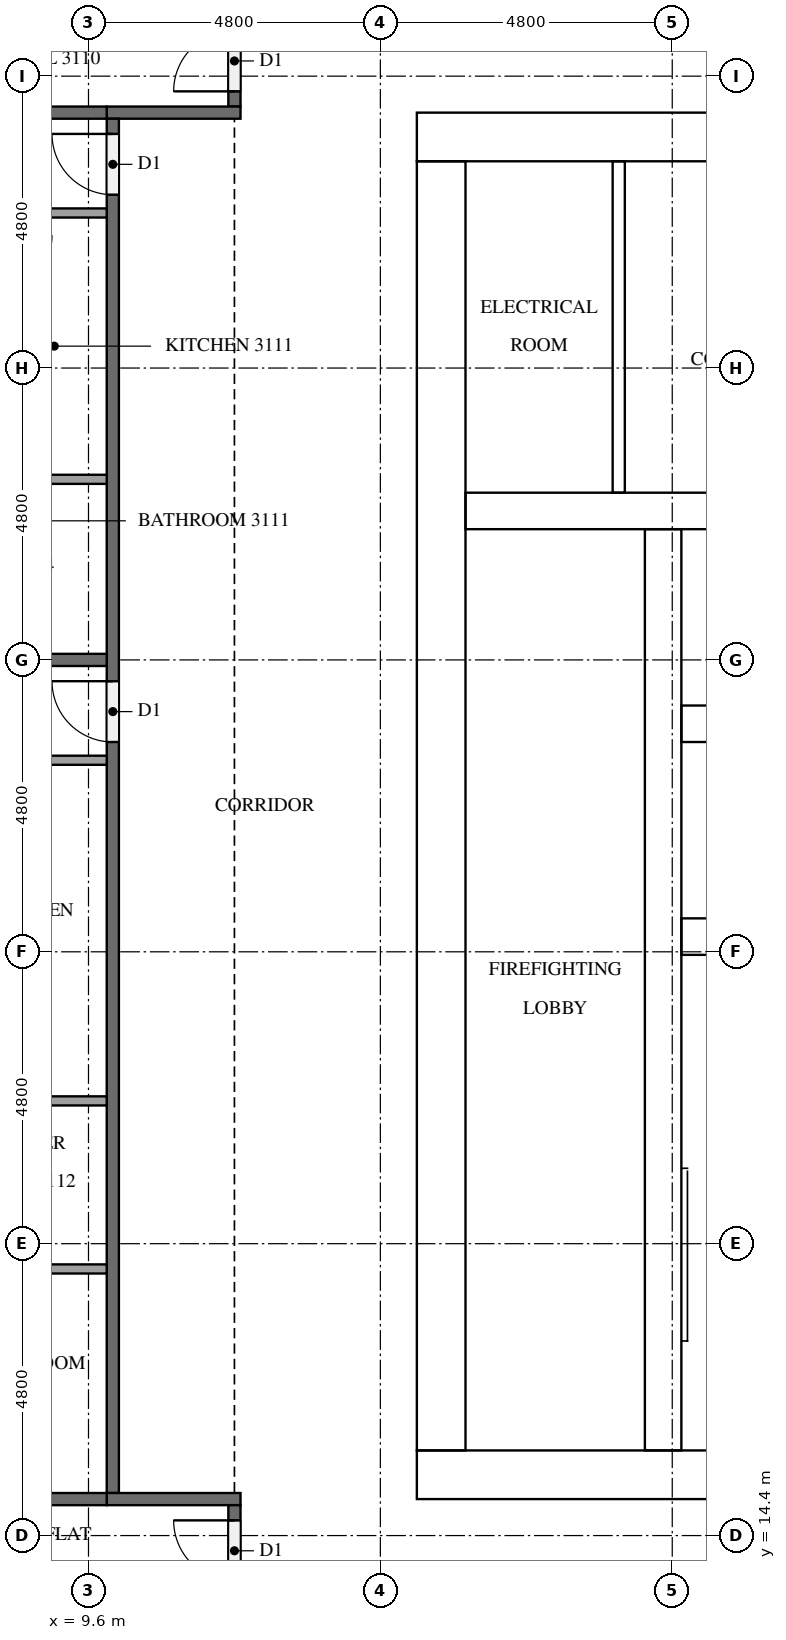
"""IFC4 building model, lengths in metres.
Left out: names, types, materials, properties, quantities, classifications, styles, units other than length and angle.
Written with IfcOpenShell. Run it as: python <this file> out.ifc"""

import sys

from ifc_helpers import new_model, si_unit, direction, frame, frame_2d, origin, place, context, subcontext, project, spatial, rectangle, extrude, element, fill, save


model = new_model("IFC4")
c1 = context("Model", 3, precision=1e-05, world=origin(), true_north=direction((0.0, 1.0)))
c2 = subcontext(c1, "Body", "Model", "MODEL_VIEW")
j1 = project(units=[si_unit("LENGTHUNIT", "METRE"), si_unit("PLANEANGLEUNIT", "RADIAN")], contexts=[c1])
p1 = place(None, origin())
s1 = spatial("IfcSite", under=j1, at=p1, CompositionType="ELEMENT")
p2 = place(p1, origin())
s2 = spatial("IfcBuilding", under=s1, at=p2, CompositionType="ELEMENT")
p3 = place(p2, frame((0.0, 0.0, 122.6)))
s3 = spatial("IfcBuildingStorey", under=s2, at=p3, CompositionType="ELEMENT", Elevation=122.6)
p4 = place(p3, frame((15.0, 15.4, 0.0), z_axis=(0.0, 0.0, 1.0), x_axis=(1.0, 0.0, 0.0)))
e1 = element("IfcWall", 1, at=p4, inside=s3, PredefinedType="SHEAR", context=c2, shape_type="SweptSolid", body=[
    extrude(rectangle(XDim=32.4, YDim=0.8, at=frame_2d((16.2, 0.0))), origin(), (0.0, 0.0, 1.0), 3.2),
])
p5 = place(p4, frame((15.3, 0.0, 0.0)))
e2 = element("IfcOpeningElement", 2, at=p5, cuts=e1, PredefinedType="OPENING", context=c2, shape_type="SweptSolid", body=[
    extrude(rectangle(XDim=1.8, YDim=2.1, at=frame_2d((0.9, 1.05))), frame((0.0, 0.41, 0.0), z_axis=(0.0, -1.0, 0.0), x_axis=(1.0, 0.0, 0.0)), (0.0, 0.0, 1.0), 0.82),
])
p6 = place(p3, frame((15.0, 37.4, 0.0), z_axis=(0.0, 0.0, 1.0), x_axis=(1.0, 0.0, 0.0)))
e3 = element("IfcWall", 3, at=p6, inside=s3, PredefinedType="SHEAR", context=c2, shape_type="SweptSolid", body=[
    extrude(rectangle(XDim=32.4, YDim=0.8, at=frame_2d((16.2, 0.0))), origin(), (0.0, 0.0, 1.0), 3.2),
])
p7 = place(p6, frame((15.3, 0.0, 0.0)))
e4 = element("IfcOpeningElement", 4, at=p7, cuts=e3, PredefinedType="OPENING", context=c2, shape_type="SweptSolid", body=[
    extrude(rectangle(XDim=1.8, YDim=2.1, at=frame_2d((0.9, 1.05))), frame((0.0, 0.41, 0.0), z_axis=(0.0, -1.0, 0.0), x_axis=(1.0, 0.0, 0.0)), (0.0, 0.0, 1.0), 0.82),
])
p8 = place(p6, frame((1.51, 0.0, 0.0)))
e5 = element("IfcOpeningElement", 5, at=p8, cuts=e3, PredefinedType="OPENING", context=c2, shape_type="SweptSolid", body=[
    extrude(rectangle(XDim=1.0, YDim=2.1, at=frame_2d((0.5, 1.05))), frame((0.0, 0.41, 0.0), z_axis=(0.0, -1.0, 0.0), x_axis=(1.0, 0.0, 0.0)), (0.0, 0.0, 1.0), 0.82),
])
p9 = place(p6, frame((5.11, 0.0, 0.0)))
e6 = element("IfcOpeningElement", 6, at=p9, cuts=e3, PredefinedType="OPENING", context=c2, shape_type="SweptSolid", body=[
    extrude(rectangle(XDim=1.0, YDim=2.1, at=frame_2d((0.5, 1.05))), frame((0.0, 0.41, 0.0), z_axis=(0.0, -1.0, 0.0), x_axis=(1.0, 0.0, 0.0)), (0.0, 0.0, 1.0), 0.82),
])
p10 = place(p3, frame((15.4, 15.8, 0.0), z_axis=(0.0, 0.0, 1.0), x_axis=(0.0, 1.0, 0.0)))
e7 = element("IfcWall", 7, at=p10, inside=s3, PredefinedType="SHEAR", context=c2, shape_type="SweptSolid", body=[
    extrude(rectangle(XDim=21.2, YDim=0.8, at=frame_2d((10.6, 0.0))), origin(), (0.0, 0.0, 1.0), 3.2),
])
p11 = place(p10, frame((4.96, 0.0, 0.0)))
e8 = element("IfcOpeningElement", 8, at=p11, cuts=e7, PredefinedType="OPENING", context=c2, shape_type="SweptSolid", body=[
    extrude(rectangle(XDim=1.2, YDim=2.1, at=frame_2d((0.6, 1.05))), frame((0.0, 0.41, 0.0), z_axis=(0.0, -1.0, 0.0), x_axis=(1.0, 0.0, 0.0)), (0.0, 0.0, 1.0), 0.82),
])
p12 = place(p3, frame((19.05, 15.8, 0.0), z_axis=(0.0, 0.0, 1.0), x_axis=(0.0, 1.0, 0.0)))
e9 = element("IfcWall", 9, at=p12, inside=s3, PredefinedType="SHEAR", context=c2, shape_type="SweptSolid", body=[
    extrude(rectangle(XDim=15.15, YDim=0.6, at=frame_2d((7.575, 0.0))), origin(), (0.0, 0.0, 1.0), 3.2),
])
p13 = place(p12, frame((9.65, 0.0, 0.0)))
e10 = element("IfcOpeningElement", 10, at=p13, cuts=e9, PredefinedType="OPENING", context=c2, shape_type="SweptSolid", body=[
    extrude(rectangle(XDim=1.1, YDim=2.1, at=frame_2d((0.55, 1.05))), frame((0.0, 0.31, 0.0), z_axis=(0.0, -1.0, 0.0), x_axis=(1.0, 0.0, 0.0)), (0.0, 0.0, 1.0), 0.62),
])
p14 = place(p12, frame((13.15, 0.0, 0.0)))
e11 = element("IfcOpeningElement", 11, at=p14, cuts=e9, PredefinedType="OPENING", context=c2, shape_type="SweptSolid", body=[
    extrude(rectangle(XDim=1.1, YDim=2.1, at=frame_2d((0.55, 1.05))), frame((0.0, 0.31, 0.0), z_axis=(0.0, -1.0, 0.0), x_axis=(1.0, 0.0, 0.0)), (0.0, 0.0, 1.0), 0.62),
])
p15 = place(p12, frame((0.4, 0.0, 0.0)))
e12 = element("IfcOpeningElement", 12, at=p15, cuts=e9, PredefinedType="OPENING", context=c2, shape_type="SweptSolid", body=[
    extrude(rectangle(XDim=1.2, YDim=2.1, at=frame_2d((0.6, 1.05))), frame((0.0, 0.31, 0.0), z_axis=(0.0, -1.0, 0.0), x_axis=(1.0, 0.0, 0.0)), (0.0, 0.0, 1.0), 0.62),
])
for number, where, z_axis, x_axis in (
    (13, (19.35, 24.25, 0.0), (0.0, 0.0, 1.0), (1.0, 0.0, 0.0)),
    (14, (19.35, 27.75, 0.0), (0.0, 0.0, 1.0), (1.0, 0.0, 0.0)),
):
    element("IfcWall", number, at=place(p3, frame(where, z_axis=z_axis, x_axis=x_axis)), inside=s3, PredefinedType="SHEAR", context=c2, shape_type="SweptSolid", body=[
        extrude(rectangle(XDim=3.45, YDim=0.6, at=frame_2d((1.725, 0.0))), origin(), (0.0, 0.0, 1.0), 3.2),
    ])
p16 = place(p3, frame((15.8, 31.25, 0.0), z_axis=(0.0, 0.0, 1.0), x_axis=(1.0, 0.0, 0.0)))
e15 = element("IfcWall", 15, at=p16, inside=s3, PredefinedType="SHEAR", context=c2, shape_type="SweptSolid", body=[
    extrude(rectangle(XDim=7.0, YDim=0.6, at=frame_2d((3.5, 0.0))), origin(), (0.0, 0.0, 1.0), 3.2),
])
p17 = place(p3, frame((18.32, 31.55, 0.0), z_axis=(0.0, 0.0, 1.0), x_axis=(0.0, 1.0, 0.0)))
e16 = element("IfcWall", 16, at=p17, inside=s3, PredefinedType="PARTITIONING", context=c2, shape_type="SweptSolid", body=[
    extrude(rectangle(XDim=5.45, YDim=0.2, at=frame_2d((2.725, 0.0))), origin(), (0.0, 0.0, 1.0), 3.2),
])
p18 = place(p3, frame((12.0, 37.9, 0.0), z_axis=(0.0, 0.0, 1.0), x_axis=(0.0, 1.0, 0.0)))
e17 = element("IfcWall", 17, at=p18, inside=s3, PredefinedType="PARTITIONING", context=c2, shape_type="SweptSolid", body=[
    extrude(rectangle(XDim=2.8, YDim=0.2, at=frame_2d((1.4, 0.0))), origin(), (0.0, 0.0, 1.0), 3.2),
])
p19 = place(p18, frame((0.25, 0.0, 0.0)))
e18 = element("IfcOpeningElement", 18, at=p19, cuts=e17, PredefinedType="OPENING", context=c2, shape_type="SweptSolid", body=[
    extrude(rectangle(XDim=1.0, YDim=2.1, at=frame_2d((0.5, 1.05))), frame((0.0, 0.11, 0.0), z_axis=(0.0, -1.0, 0.0), x_axis=(1.0, 0.0, 0.0)), (0.0, 0.0, 1.0), 0.22),
])
p20 = place(p3, frame((12.1, 37.8, 0.0), z_axis=(0.0, 0.0, 1.0), x_axis=(-1.0, 0.0, 0.0)))
e19 = element("IfcWall", 19, at=p20, inside=s3, PredefinedType="PARTITIONING", context=c2, shape_type="SweptSolid", body=[
    extrude(rectangle(XDim=2.2, YDim=0.2, at=frame_2d((1.1, 0.0))), origin(), (0.0, 0.0, 1.0), 3.2),
])
p21 = place(p3, frame((10.0, 15.1, 0.0), z_axis=(0.0, 0.0, 1.0), x_axis=(0.0, 1.0, 0.0)))
e20 = element("IfcWall", 20, at=p21, inside=s3, PredefinedType="PARTITIONING", context=c2, shape_type="SweptSolid", body=[
    extrude(rectangle(XDim=22.6, YDim=0.2, at=frame_2d((11.3, 0.0))), origin(), (0.0, 0.0, 1.0), 3.2),
])
p22 = place(p21, frame((21.35, 0.0, 0.0)))
e21 = element("IfcOpeningElement", 21, at=p22, cuts=e20, PredefinedType="OPENING", context=c2, shape_type="SweptSolid", body=[
    extrude(rectangle(XDim=1.0, YDim=2.1, at=frame_2d((0.5, 1.05))), frame((0.0, 0.11, 0.0), z_axis=(0.0, -1.0, 0.0), x_axis=(1.0, 0.0, 0.0)), (0.0, 0.0, 1.0), 0.22),
])
p23 = place(p21, frame((12.35, 0.0, 0.0)))
e22 = element("IfcOpeningElement", 22, at=p23, cuts=e20, PredefinedType="OPENING", context=c2, shape_type="SweptSolid", body=[
    extrude(rectangle(XDim=1.0, YDim=2.1, at=frame_2d((0.5, 1.05))), frame((0.0, 0.11, 0.0), z_axis=(0.0, -1.0, 0.0), x_axis=(1.0, 0.0, 0.0)), (0.0, 0.0, 1.0), 0.22),
])
p24 = place(p3, frame((9.9, 15.0, 0.0), z_axis=(0.0, 0.0, 1.0), x_axis=(1.0, 0.0, 0.0)))
e23 = element("IfcWall", 23, at=p24, inside=s3, PredefinedType="PARTITIONING", context=c2, shape_type="SweptSolid", body=[
    extrude(rectangle(XDim=2.2, YDim=0.2, at=frame_2d((1.1, 0.0))), origin(), (0.0, 0.0, 1.0), 3.2),
])
p25 = place(p3, frame((12.0, 12.1, 0.0), z_axis=(0.0, 0.0, 1.0), x_axis=(0.0, 1.0, 0.0)))
e24 = element("IfcWall", 24, at=p25, inside=s3, PredefinedType="PARTITIONING", context=c2, shape_type="SweptSolid", body=[
    extrude(rectangle(XDim=2.8, YDim=0.2, at=frame_2d((1.4, 0.0))), origin(), (0.0, 0.0, 1.0), 3.2),
])
p26 = place(p25, frame((1.55, 0.0, 0.0)))
e25 = element("IfcOpeningElement", 25, at=p26, cuts=e24, PredefinedType="OPENING", context=c2, shape_type="SweptSolid", body=[
    extrude(rectangle(XDim=1.0, YDim=2.1, at=frame_2d((0.5, 1.05))), frame((0.0, 0.11, 0.0), z_axis=(0.0, -1.0, 0.0), x_axis=(1.0, 0.0, 0.0)), (0.0, 0.0, 1.0), 0.22),
])
for number, where, z_axis, x_axis in (
    (26, (0.375, 37.8, 0.0), (0.0, 0.0, 1.0), (1.0, 0.0, 0.0)),
    (27, (0.375, 28.8, 0.0), (0.0, 0.0, 1.0), (1.0, 0.0, 0.0)),
):
    element("IfcWall", number, at=place(p3, frame(where, z_axis=z_axis, x_axis=x_axis)), inside=s3, PredefinedType="PARTITIONING", context=c2, shape_type="SweptSolid", body=[
        extrude(rectangle(XDim=9.525, YDim=0.2, at=frame_2d((4.762, 0.0))), origin(), (0.0, 0.0, 1.0), 3.2),
    ])
p27 = place(p3, frame((0.1, 15.0, 0.0), z_axis=(0.0, 0.0, 1.0), x_axis=(1.0, 0.0, 0.0)))
e28 = element("IfcWall", 28, at=p27, inside=s3, PredefinedType="PARTITIONING", context=c2, shape_type="SweptSolid", body=[
    extrude(rectangle(XDim=9.8, YDim=0.2, at=frame_2d((4.9, 0.0))), origin(), (0.0, 0.0, 1.0), 3.2),
])
p28 = place(p3, frame((9.9, 31.77, 0.0), z_axis=(0.0, 0.0, 1.0), x_axis=(-1.0, 0.0, 0.0)))
e29 = element("IfcWall", 29, at=p28, inside=s3, PredefinedType="PARTITIONING", context=c2, shape_type="SweptSolid", body=[
    extrude(rectangle(XDim=1.725, YDim=0.15, at=frame_2d((0.862, 0.0))), origin(), (0.0, 0.0, 1.0), 3.2),
])
p29 = place(p3, frame((9.9, 36.15, 0.0), z_axis=(0.0, 0.0, 1.0), x_axis=(-1.0, 0.0, 0.0)))
e30 = element("IfcWall", 30, at=p29, inside=s3, PredefinedType="PARTITIONING", context=c2, shape_type="SweptSolid", body=[
    extrude(rectangle(XDim=1.875, YDim=0.15, at=frame_2d((0.938, 0.0))), origin(), (0.0, 0.0, 1.0), 3.2),
])
for number, where, z_axis, x_axis in (
    (31, (9.9, 21.548, 0.0), (0.0, 0.0, 1.0), (-1.0, 0.0, 0.0)),
    (32, (9.9, 18.785, 0.0), (0.0, 0.0, 1.0), (-1.0, 0.0, 0.0)),
):
    element("IfcWall", number, at=place(p3, frame(where, z_axis=z_axis, x_axis=x_axis)), inside=s3, PredefinedType="PARTITIONING", context=c2, shape_type="SweptSolid", body=[
        extrude(rectangle(XDim=2.475, YDim=0.15, at=frame_2d((1.237, 0.0))), origin(), (0.0, 0.0, 1.0), 3.2),
    ])
p30 = place(p3, frame((9.9, 27.15, 0.0), z_axis=(0.0, 0.0, 1.0), x_axis=(-1.0, 0.0, 0.0)))
e33 = element("IfcWall", 33, at=p30, inside=s3, PredefinedType="PARTITIONING", context=c2, shape_type="SweptSolid", body=[
    extrude(rectangle(XDim=2.625, YDim=0.15, at=frame_2d((1.312, 0.0))), origin(), (0.0, 0.0, 1.0), 3.2),
])
p31 = place(p13, origin())
e34 = element("IfcDoor", 34, at=p31, inside=s3, OperationType="DOUBLE_DOOR_SLIDING", PredefinedType="DOOR", context=c2, shape_type="SweptSolid", body=[
    extrude(rectangle(XDim=1.1, YDim=2.1, at=frame_2d((0.55, 1.05))), frame((0.0, 0.025, 0.0), z_axis=(0.0, -1.0, 0.0), x_axis=(1.0, 0.0, 0.0)), (0.0, 0.0, 1.0), 0.05),
])
fill(e10, e34)
p32 = place(p14, origin())
e35 = element("IfcDoor", 35, at=p32, inside=s3, OperationType="DOUBLE_DOOR_SLIDING", PredefinedType="DOOR", context=c2, shape_type="SweptSolid", body=[
    extrude(rectangle(XDim=1.1, YDim=2.1, at=frame_2d((0.55, 1.05))), frame((0.0, 0.025, 0.0), z_axis=(0.0, -1.0, 0.0), x_axis=(1.0, 0.0, 0.0)), (0.0, 0.0, 1.0), 0.05),
])
fill(e11, e35)
p33 = place(p15, frame((1.2, 0.0, 0.0), z_axis=(0.0, 0.0, 1.0), x_axis=(-1.0, 0.0, 0.0)))
e36 = element("IfcDoor", 36, at=p33, inside=s3, OperationType="SINGLE_SWING_LEFT", PredefinedType="DOOR", context=c2, shape_type="SweptSolid", body=[
    extrude(rectangle(XDim=1.2, YDim=2.1, at=frame_2d((0.6, 1.05))), frame((0.0, 0.025, 0.0), z_axis=(0.0, -1.0, 0.0), x_axis=(1.0, 0.0, 0.0)), (0.0, 0.0, 1.0), 0.05),
])
fill(e12, e36)
p34 = place(p11, frame((1.2, 0.0, 0.0), z_axis=(0.0, 0.0, 1.0), x_axis=(-1.0, 0.0, 0.0)))
e37 = element("IfcDoor", 37, at=p34, inside=s3, OperationType="SINGLE_SWING_RIGHT", PredefinedType="DOOR", context=c2, shape_type="SweptSolid", body=[
    extrude(rectangle(XDim=1.2, YDim=2.1, at=frame_2d((0.6, 1.05))), frame((0.0, 0.025, 0.0), z_axis=(0.0, -1.0, 0.0), x_axis=(1.0, 0.0, 0.0)), (0.0, 0.0, 1.0), 0.05),
])
fill(e8, e37)
p35 = place(p8, origin())
e38 = element("IfcDoor", 38, at=p35, inside=s3, OperationType="SINGLE_SWING_RIGHT", PredefinedType="DOOR", context=c2, shape_type="SweptSolid", body=[
    extrude(rectangle(XDim=1.0, YDim=2.1, at=frame_2d((0.5, 1.05))), frame((0.0, 0.025, 0.0), z_axis=(0.0, -1.0, 0.0), x_axis=(1.0, 0.0, 0.0)), (0.0, 0.0, 1.0), 0.05),
])
fill(e5, e38)
p36 = place(p19, origin())
e39 = element("IfcDoor", 39, at=p36, inside=s3, OperationType="SINGLE_SWING_LEFT", PredefinedType="DOOR", context=c2, shape_type="SweptSolid", body=[
    extrude(rectangle(XDim=1.0, YDim=2.1, at=frame_2d((0.5, 1.05))), frame((0.0, 0.025, 0.0), z_axis=(0.0, -1.0, 0.0), x_axis=(1.0, 0.0, 0.0)), (0.0, 0.0, 1.0), 0.05),
])
fill(e18, e39)
p37 = place(p22, origin())
e40 = element("IfcDoor", 40, at=p37, inside=s3, OperationType="SINGLE_SWING_RIGHT", PredefinedType="DOOR", context=c2, shape_type="SweptSolid", body=[
    extrude(rectangle(XDim=1.0, YDim=2.1, at=frame_2d((0.5, 1.05))), frame((0.0, 0.025, 0.0), z_axis=(0.0, -1.0, 0.0), x_axis=(1.0, 0.0, 0.0)), (0.0, 0.0, 1.0), 0.05),
])
fill(e21, e40)
p38 = place(p23, origin())
e41 = element("IfcDoor", 41, at=p38, inside=s3, OperationType="SINGLE_SWING_RIGHT", PredefinedType="DOOR", context=c2, shape_type="SweptSolid", body=[
    extrude(rectangle(XDim=1.0, YDim=2.1, at=frame_2d((0.5, 1.05))), frame((0.0, 0.025, 0.0), z_axis=(0.0, -1.0, 0.0), x_axis=(1.0, 0.0, 0.0)), (0.0, 0.0, 1.0), 0.05),
])
fill(e22, e41)
p39 = place(p26, origin())
e42 = element("IfcDoor", 42, at=p39, inside=s3, OperationType="SINGLE_SWING_RIGHT", PredefinedType="DOOR", context=c2, shape_type="SweptSolid", body=[
    extrude(rectangle(XDim=1.0, YDim=2.1, at=frame_2d((0.5, 1.05))), frame((0.0, 0.025, 0.0), z_axis=(0.0, -1.0, 0.0), x_axis=(1.0, 0.0, 0.0)), (0.0, 0.0, 1.0), 0.05),
])
fill(e25, e42)
save(model, sys.argv[1])
